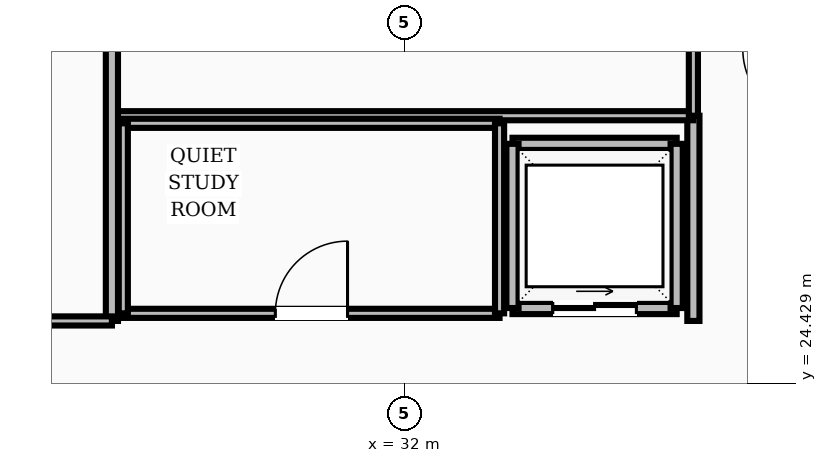
"""IFC4 building model, lengths in metres.
Left out: names, types, materials, properties, quantities, classifications, styles, units other than length and angle.
Written with IfcOpenShell. Run it as: python <this file> out.ifc"""

import sys

from ifc_helpers import new_model, si_unit, direction, frame, frame_2d, origin, place, context, subcontext, project, spatial, rectangle, extrude, element, fill, save


model = new_model("IFC4")
c1 = context("Model", 3, precision=1e-05, world=origin(), true_north=direction((0.0, 1.0)))
c2 = subcontext(c1, "Body", "Model", "MODEL_VIEW")
j1 = project(units=[si_unit("LENGTHUNIT", "METRE"), si_unit("PLANEANGLEUNIT", "RADIAN")], contexts=[c1])
p1 = place(None, origin())
s1 = spatial("IfcSite", under=j1, at=p1, CompositionType="ELEMENT")
p2 = place(p1, origin())
s2 = spatial("IfcBuilding", under=s1, at=p2, CompositionType="ELEMENT")
p3 = place(p2, frame((0.0, 0.0, 258.0)))
s3 = spatial("IfcBuildingStorey", under=s2, at=p3, CompositionType="ELEMENT", Elevation=258.0)
p4 = place(p3, frame((35.8, 25.25, 0.0), z_axis=(0.0, 0.0, 1.0), x_axis=(0.0, 1.0, 0.0)))
e1 = element("IfcWall", 1, at=p4, inside=s3, PredefinedType="SOLIDWALL", context=c2, shape_type="SweptSolid", body=[
    extrude(rectangle(XDim=2.7, YDim=0.16, at=frame_2d((1.35, 0.0))), origin(), (0.0, 0.0, 1.0), 2.87),
])
p5 = place(p3, frame((33.42, 25.42, 0.0), z_axis=(0.0, 0.0, 1.0), x_axis=(1.0, 0.0, 0.0)))
e2 = element("IfcWall", 2, at=p5, inside=s3, PredefinedType="SOLIDWALL", context=c2, shape_type="SweptSolid", body=[
    extrude(rectangle(XDim=2.16, YDim=0.16, at=frame_2d((1.08, 0.0))), origin(), (0.0, 0.0, 1.0), 2.87),
])
p6 = place(p5, frame((0.53, 0.0, 0.0)))
e3 = element("IfcOpeningElement", 3, at=p6, cuts=e2, PredefinedType="OPENING", context=c2, shape_type="SweptSolid", body=[
    extrude(rectangle(XDim=1.1, YDim=2.15, at=frame_2d((0.55, 1.075))), frame((0.0, 0.09, 0.0), z_axis=(0.0, -1.0, 0.0), x_axis=(1.0, 0.0, 0.0)), (0.0, 0.0, 1.0), 0.18),
])
for number, where, z_axis, x_axis in (
    (4, (33.42, 27.58, 0.0), (0.0, 0.0, 1.0), (1.0, 0.0, 0.0)),
    (5, (33.42, 25.42, 0.0), (0.0, 0.0, 1.0), (0.0, 1.0, 0.0)),
    (6, (35.58, 25.42, 0.0), (0.0, 0.0, 1.0), (0.0, 1.0, 0.0)),
):
    element("IfcWall", number, at=place(p3, frame(where, z_axis=z_axis, x_axis=x_axis)), inside=s3, PredefinedType="SOLIDWALL", context=c2, shape_type="SweptSolid", body=[
        extrude(rectangle(XDim=2.16, YDim=0.16, at=frame_2d((1.08, 0.0))), origin(), (0.0, 0.0, 1.0), 2.87),
    ])
p7 = place(p3, frame((28.2, 27.95, 0.0), z_axis=(0.0, 0.0, 1.0), x_axis=(1.0, 0.0, 0.0)))
e7 = element("IfcWall", 7, at=p7, inside=s3, PredefinedType="PARTITIONING", context=c2, shape_type="SweptSolid", body=[
    extrude(rectangle(XDim=7.6, YDim=0.12, at=frame_2d((3.8, 0.0))), origin(), (0.0, 0.0, 1.0), 2.87),
])
p8 = place(p3, frame((35.8, 27.95, 0.0), z_axis=(0.0, 0.0, 1.0), x_axis=(0.0, 1.0, 0.0)))
e8 = element("IfcWall", 8, at=p8, inside=s3, PredefinedType="PARTITIONING", context=c2, shape_type="SweptSolid", body=[
    extrude(rectangle(XDim=3.5, YDim=0.12, at=frame_2d((1.75, 0.0))), origin(), (0.0, 0.0, 1.0), 2.87),
])
p9 = place(p8, frame((1.275, 0.0, 0.0)))
e9 = element("IfcOpeningElement", 9, at=p9, cuts=e8, PredefinedType="OPENING", context=c2, shape_type="SweptSolid", body=[
    extrude(rectangle(XDim=0.95, YDim=2.1, at=frame_2d((0.475, 1.05))), frame((0.0, 0.07, 0.0), z_axis=(0.0, -1.0, 0.0), x_axis=(1.0, 0.0, 0.0)), (0.0, 0.0, 1.0), 0.14),
])
p10 = place(p3, frame((28.3, 25.35, 0.0), z_axis=(0.0, 0.0, 1.0), x_axis=(1.0, 0.0, 0.0)))
e10 = element("IfcWall", 10, at=p10, inside=s3, PredefinedType="PARTITIONING", context=c2, shape_type="SweptSolid", body=[
    extrude(rectangle(XDim=4.95, YDim=0.12, at=frame_2d((2.475, 0.0))), origin(), (0.0, 0.0, 1.0), 2.87),
])
p11 = place(p10, frame((2.0, 0.0, 0.0)))
e11 = element("IfcOpeningElement", 11, at=p11, cuts=e10, PredefinedType="OPENING", context=c2, shape_type="SweptSolid", body=[
    extrude(rectangle(XDim=0.95, YDim=2.1, at=frame_2d((0.475, 1.05))), frame((0.0, 0.07, 0.0), z_axis=(0.0, -1.0, 0.0), x_axis=(1.0, 0.0, 0.0)), (0.0, 0.0, 1.0), 0.14),
])
p12 = place(p3, frame((28.3, 27.85, 0.0), z_axis=(0.0, 0.0, 1.0), x_axis=(1.0, 0.0, 0.0)))
e12 = element("IfcWall", 12, at=p12, inside=s3, PredefinedType="PARTITIONING", context=c2, shape_type="SweptSolid", body=[
    extrude(rectangle(XDim=4.95, YDim=0.12, at=frame_2d((2.475, 0.0))), origin(), (0.0, 0.0, 1.0), 2.87),
])
for number, where, z_axis, x_axis in (
    (13, (28.3, 25.35, 0.0), (0.0, 0.0, 1.0), (0.0, 1.0, 0.0)),
    (14, (33.25, 25.35, 0.0), (0.0, 0.0, 1.0), (0.0, 1.0, 0.0)),
):
    element("IfcWall", number, at=place(p3, frame(where, z_axis=z_axis, x_axis=x_axis)), inside=s3, PredefinedType="PARTITIONING", context=c2, shape_type="SweptSolid", body=[
        extrude(rectangle(XDim=2.5, YDim=0.12, at=frame_2d((1.25, 0.0))), origin(), (0.0, 0.0, 1.0), 2.87),
    ])
p13 = place(p3, frame((28.15, 25.25, 0.0), z_axis=(0.0, 0.0, 1.0), x_axis=(0.0, 1.0, 0.0)))
e15 = element("IfcWall", 15, at=p13, inside=s3, PredefinedType="SOLIDWALL", context=c2, shape_type="SweptSolid", body=[
    extrude(rectangle(XDim=6.1, YDim=0.16, at=frame_2d((3.05, 0.0))), origin(), (0.0, 0.0, 1.0), 2.87),
])
p14 = place(p3, frame((24.95, 25.25, 0.0), z_axis=(0.0, 0.0, 1.0), x_axis=(1.0, 0.0, 0.0)))
e16 = element("IfcWall", 16, at=p14, inside=s3, PredefinedType="PARTITIONING", context=c2, shape_type="SweptSolid", body=[
    extrude(rectangle(XDim=3.2, YDim=0.12, at=frame_2d((1.6, 0.0))), origin(), (0.0, 0.0, 1.0), 2.87),
])
p15 = place(p14, frame((1.125, 0.0, 0.0)))
e17 = element("IfcOpeningElement", 17, at=p15, cuts=e16, PredefinedType="OPENING", context=c2, shape_type="SweptSolid", body=[
    extrude(rectangle(XDim=0.95, YDim=2.1, at=frame_2d((0.475, 1.05))), frame((0.0, 0.07, 0.0), z_axis=(0.0, -1.0, 0.0), x_axis=(1.0, 0.0, 0.0)), (0.0, 0.0, 1.0), 0.14),
])
p16 = place(p6, origin())
e18 = element("IfcDoor", 18, at=p16, inside=s3, OperationType="SLIDING_TO_RIGHT", PredefinedType="DOOR", context=c2, shape_type="SweptSolid", body=[
    extrude(rectangle(XDim=1.1, YDim=2.15, at=frame_2d((0.55, 1.075))), frame((0.0, 0.025, 0.0), z_axis=(0.0, -1.0, 0.0), x_axis=(1.0, 0.0, 0.0)), (0.0, 0.0, 1.0), 0.05),
])
fill(e3, e18)
p17 = place(p11, origin())
e19 = element("IfcDoor", 19, at=p17, inside=s3, OperationType="SINGLE_SWING_RIGHT", PredefinedType="DOOR", context=c2, shape_type="SweptSolid", body=[
    extrude(rectangle(XDim=0.95, YDim=2.1, at=frame_2d((0.475, 1.05))), frame((0.0, 0.025, 0.0), z_axis=(0.0, -1.0, 0.0), x_axis=(1.0, 0.0, 0.0)), (0.0, 0.0, 1.0), 0.05),
])
fill(e11, e19)
save(model, sys.argv[1])
